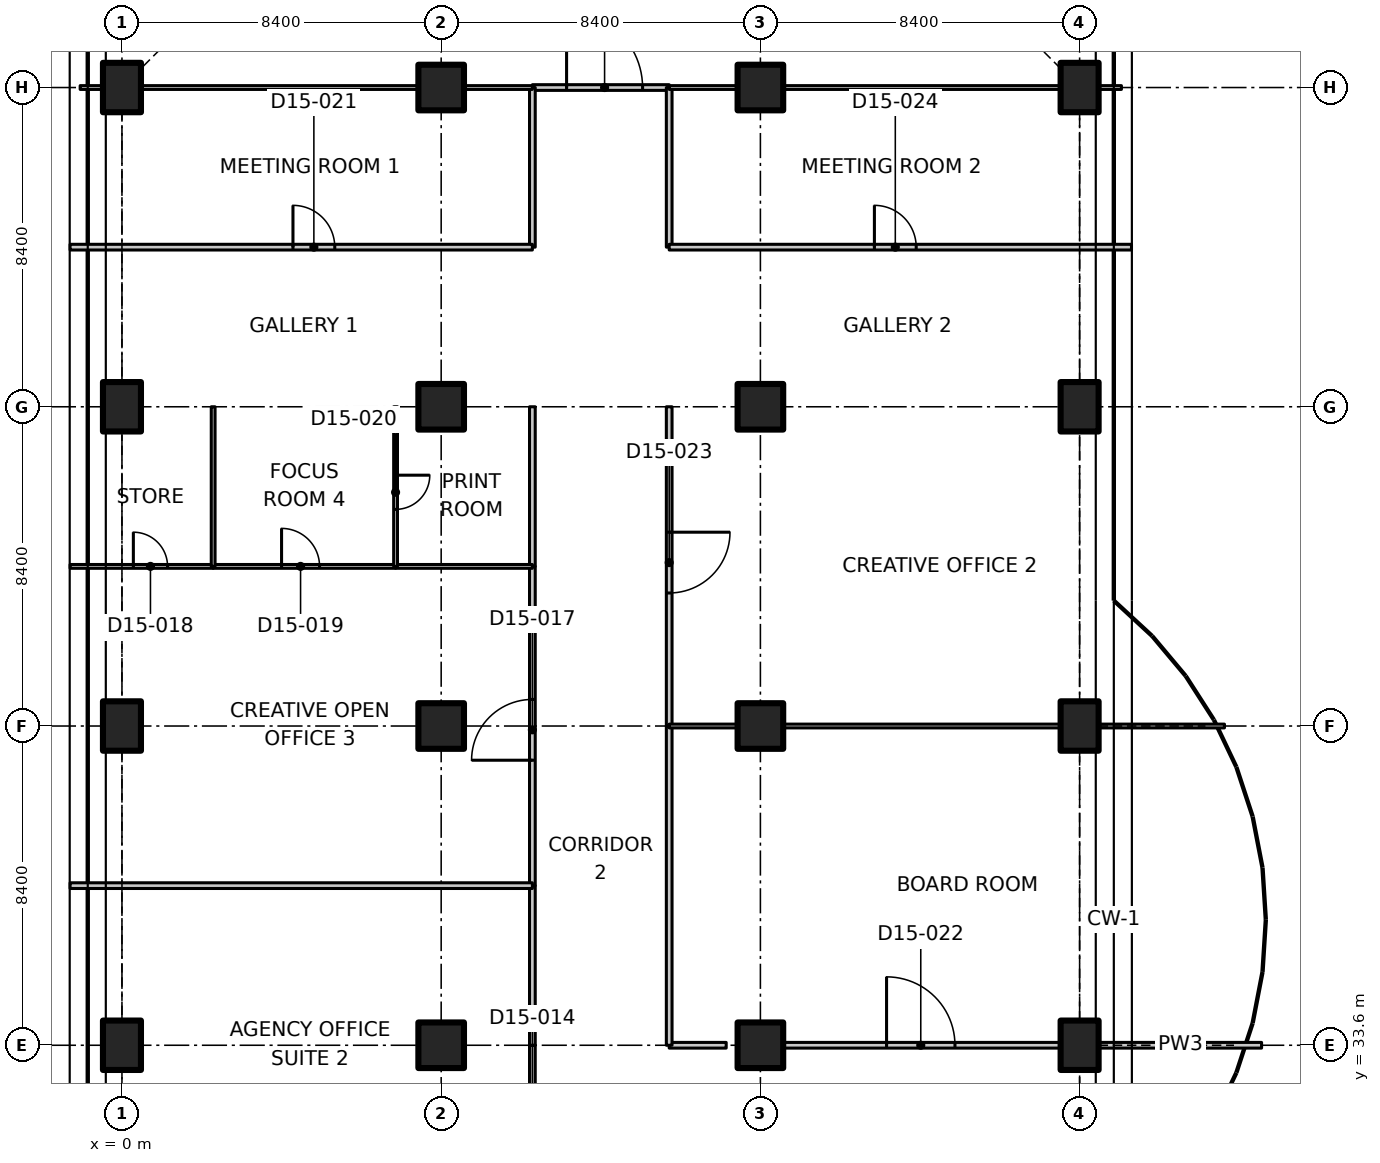
"""IFC4 building model, lengths in metres.
Left out: names, types, materials, properties, quantities, classifications, styles, units other than length and angle.
Written with IfcOpenShell. Run it as: python <this file> out.ifc"""

import sys

from ifc_helpers import new_model, si_unit, direction, frame, frame_2d, origin, origin_2d, place, context, subcontext, project, spatial, polyline, rectangle, outline, extrude, element, fill, save


model = new_model("IFC4")
c1 = context("Model", 3, precision=1e-05, world=origin(), true_north=direction((0.0, 1.0)))
c2 = subcontext(c1, "Body", "Model", "MODEL_VIEW")
j1 = project(units=[si_unit("LENGTHUNIT", "METRE"), si_unit("PLANEANGLEUNIT", "RADIAN")], contexts=[c1])
p1 = place(None, origin())
s1 = spatial("IfcSite", under=j1, at=p1, CompositionType="ELEMENT")
p2 = place(p1, origin())
s2 = spatial("IfcBuilding", under=s1, at=p2, CompositionType="ELEMENT")
p3 = place(p2, frame((0.0, 0.0, 113.3)))
s3 = spatial("IfcBuildingStorey", under=s2, at=p3, CompositionType="ELEMENT", Elevation=113.3)
for number, where, z_axis, x_axis in (
    (1, (0.0, 33.6, 0.0), (0.0, 0.0, 1.0), (1.0, 0.0, 0.0)),
    (2, (0.0, 42.0, 0.0), (0.0, 0.0, 1.0), (1.0, 0.0, 0.0)),
    (3, (0.0, 50.4, 0.0), (0.0, 0.0, 1.0), (1.0, 0.0, 0.0)),
    (4, (0.0, 58.8, 0.0), (0.0, 0.0, 1.0), (1.0, 0.0, 0.0)),
):
    element("IfcColumn", number, at=place(p3, frame(where, z_axis=z_axis, x_axis=x_axis)), inside=s3, PredefinedType="COLUMN", context=c2, shape_type="SweptSolid", body=[
        extrude(rectangle(XDim=1.0, YDim=1.3, at=origin_2d()), origin(), (0.0, 0.0, 1.0), 3.35),
    ])
for number, where, z_axis, x_axis in (
    (5, (8.4, 33.6, 0.0), (0.0, 0.0, 1.0), (1.0, 0.0, 0.0)),
    (6, (8.4, 42.0, 0.0), (0.0, 0.0, 1.0), (1.0, 0.0, 0.0)),
    (7, (8.4, 50.4, 0.0), (0.0, 0.0, 1.0), (1.0, 0.0, 0.0)),
    (8, (8.4, 58.8, 0.0), (0.0, 0.0, 1.0), (1.0, 0.0, 0.0)),
    (9, (16.8, 33.6, 0.0), (0.0, 0.0, 1.0), (1.0, 0.0, 0.0)),
    (10, (16.8, 42.0, 0.0), (0.0, 0.0, 1.0), (1.0, 0.0, 0.0)),
    (11, (16.8, 50.4, 0.0), (0.0, 0.0, 1.0), (1.0, 0.0, 0.0)),
    (12, (16.8, 58.8, 0.0), (0.0, 0.0, 1.0), (1.0, 0.0, 0.0)),
):
    element("IfcColumn", number, at=place(p3, frame(where, z_axis=z_axis, x_axis=x_axis)), inside=s3, PredefinedType="COLUMN", context=c2, shape_type="SweptSolid", body=[
        extrude(rectangle(XDim=1.2, YDim=1.2, at=origin_2d()), origin(), (0.0, 0.0, 1.0), 3.35),
    ])
for number, where, z_axis, x_axis in (
    (13, (25.2, 33.6, 0.0), (0.0, 0.0, 1.0), (1.0, 0.0, 0.0)),
    (14, (25.2, 42.0, 0.0), (0.0, 0.0, 1.0), (1.0, 0.0, 0.0)),
    (15, (25.2, 50.4, 0.0), (0.0, 0.0, 1.0), (1.0, 0.0, 0.0)),
    (16, (25.2, 58.8, 0.0), (0.0, 0.0, 1.0), (1.0, 0.0, 0.0)),
):
    element("IfcColumn", number, at=place(p3, frame(where, z_axis=z_axis, x_axis=x_axis)), inside=s3, PredefinedType="COLUMN", context=c2, shape_type="SweptSolid", body=[
        extrude(rectangle(XDim=1.0, YDim=1.3, at=origin_2d()), origin(), (0.0, 0.0, 1.0), 3.35),
    ])
p4 = place(p3, frame((10.8, 29.4, 0.0), z_axis=(0.0, 0.0, 1.0), x_axis=(0.0, 1.0, 0.0)))
e17 = element("IfcWall", 17, at=p4, inside=s3, PredefinedType="PARTITIONING", context=c2, shape_type="SweptSolid", body=[
    extrude(rectangle(XDim=4.2, YDim=0.15, at=frame_2d((2.1, 0.0))), origin(), (0.0, 0.0, 1.0), 3.33),
])
p5 = place(p4, frame((1.2, 0.0, 0.0)))
e18 = element("IfcOpeningElement", 18, at=p5, cuts=e17, PredefinedType="OPENING", context=c2, shape_type="SweptSolid", body=[
    extrude(rectangle(XDim=1.6, YDim=2.1, at=frame_2d((0.8, 1.05))), frame((0.0, 0.085, 0.0), z_axis=(0.0, -1.0, 0.0), x_axis=(1.0, 0.0, 0.0)), (0.0, 0.0, 1.0), 0.17),
])
p6 = place(p3, frame((14.4, 33.6, 0.0), z_axis=(0.0, 0.0, 1.0), x_axis=(1.0, 0.0, 0.0)))
e19 = element("IfcWall", 19, at=p6, inside=s3, PredefinedType="PARTITIONING", context=c2, shape_type="SweptSolid", body=[
    extrude(rectangle(XDim=1.5, YDim=0.15, at=frame_2d((0.75, 0.0))), origin(), (0.0, 0.0, 1.0), 3.33),
])
p7 = place(p3, frame((17.42, 33.6, 0.0), z_axis=(0.0, 0.0, 1.0), x_axis=(1.0, 0.0, 0.0)))
e20 = element("IfcWall", 20, at=p7, inside=s3, PredefinedType="PARTITIONING", context=c2, shape_type="SweptSolid", body=[
    extrude(rectangle(XDim=7.26, YDim=0.15, at=frame_2d((3.63, 0.0))), origin(), (0.0, 0.0, 1.0), 3.33),
])
p8 = place(p7, frame((2.7, 0.0, 0.0)))
e21 = element("IfcOpeningElement", 21, at=p8, cuts=e20, PredefinedType="OPENING", context=c2, shape_type="SweptSolid", body=[
    extrude(rectangle(XDim=1.8, YDim=2.1, at=frame_2d((0.9, 1.05))), frame((0.0, 0.085, 0.0), z_axis=(0.0, -1.0, 0.0), x_axis=(1.0, 0.0, 0.0)), (0.0, 0.0, 1.0), 0.17),
])
p9 = place(p3, frame((25.72, 33.6, 0.0), z_axis=(0.0, 0.0, 1.0), x_axis=(1.0, 0.0, 0.0)))
e22 = element("IfcWall", 22, at=p9, inside=s3, PredefinedType="PARTITIONING", context=c2, shape_type="SweptSolid", body=[
    extrude(rectangle(XDim=4.268, YDim=0.15, at=frame_2d((2.134, 0.0))), origin(), (0.0, 0.0, 1.0), 2.98),
])
p10 = place(p3, frame((10.8, 58.8, 0.0), z_axis=(0.0, 0.0, 1.0), x_axis=(1.0, 0.0, 0.0)))
e23 = element("IfcWall", 23, at=p10, inside=s3, PredefinedType="PARTITIONING", context=c2, shape_type="SweptSolid", body=[
    extrude(rectangle(XDim=3.6, YDim=0.15, at=frame_2d((1.8, 0.0))), origin(), (0.0, 0.0, 1.0), 3.33),
])
p11 = place(p10, frame((0.9, 0.0, 0.0)))
e24 = element("IfcOpeningElement", 24, at=p11, cuts=e23, PredefinedType="OPENING", context=c2, shape_type="SweptSolid", body=[
    extrude(rectangle(XDim=2.0, YDim=2.4, at=frame_2d((1.0, 1.2))), frame((0.0, 0.085, 0.0), z_axis=(0.0, -1.0, 0.0), x_axis=(1.0, 0.0, 0.0)), (0.0, 0.0, 1.0), 0.17),
])
p12 = place(p3, frame((10.8, 33.6, 0.0), z_axis=(0.0, 0.0, 1.0), x_axis=(0.0, 1.0, 0.0)))
e25 = element("IfcWall", 25, at=p12, inside=s3, PredefinedType="PARTITIONING", context=c2, shape_type="SweptSolid", body=[
    extrude(rectangle(XDim=4.2, YDim=0.15, at=frame_2d((2.1, 0.0))), origin(), (0.0, 0.0, 1.0), 3.33),
])
p13 = place(p3, frame((10.8, 37.8, 0.0), z_axis=(0.0, 0.0, 1.0), x_axis=(0.0, 1.0, 0.0)))
e26 = element("IfcWall", 26, at=p13, inside=s3, PredefinedType="PARTITIONING", context=c2, shape_type="SweptSolid", body=[
    extrude(rectangle(XDim=8.4, YDim=0.15, at=frame_2d((4.2, 0.0))), origin(), (0.0, 0.0, 1.0), 3.33),
])
p14 = place(p13, frame((3.3, 0.0, 0.0)))
e27 = element("IfcOpeningElement", 27, at=p14, cuts=e26, PredefinedType="OPENING", context=c2, shape_type="SweptSolid", body=[
    extrude(rectangle(XDim=1.6, YDim=2.1, at=frame_2d((0.8, 1.05))), frame((0.0, 0.085, 0.0), z_axis=(0.0, -1.0, 0.0), x_axis=(1.0, 0.0, 0.0)), (0.0, 0.0, 1.0), 0.17),
])
for number, where, z_axis, x_axis in (
    (28, (10.8, 46.2, 0.0), (0.0, 0.0, 1.0), (0.0, 1.0, 0.0)),
    (29, (10.8, 54.6, 0.0), (0.0, 0.0, 1.0), (0.0, 1.0, 0.0)),
):
    element("IfcWall", number, at=place(p3, frame(where, z_axis=z_axis, x_axis=x_axis)), inside=s3, PredefinedType="PARTITIONING", context=c2, shape_type="SweptSolid", body=[
        extrude(rectangle(XDim=4.2, YDim=0.15, at=frame_2d((2.1, 0.0))), origin(), (0.0, 0.0, 1.0), 3.33),
    ])
p15 = place(p3, frame((14.4, 42.0, 0.0), z_axis=(0.0, 0.0, 1.0), x_axis=(0.0, -1.0, 0.0)))
e30 = element("IfcWall", 30, at=p15, inside=s3, PredefinedType="PARTITIONING", context=c2, shape_type="SweptSolid", body=[
    extrude(rectangle(XDim=8.4, YDim=0.15, at=frame_2d((4.2, 0.0))), origin(), (0.0, 0.0, 1.0), 3.33),
])
p16 = place(p3, frame((14.4, 50.4, 0.0), z_axis=(0.0, 0.0, 1.0), x_axis=(0.0, -1.0, 0.0)))
e31 = element("IfcWall", 31, at=p16, inside=s3, PredefinedType="PARTITIONING", context=c2, shape_type="SweptSolid", body=[
    extrude(rectangle(XDim=8.4, YDim=0.15, at=frame_2d((4.2, 0.0))), origin(), (0.0, 0.0, 1.0), 3.33),
])
p17 = place(p16, frame((3.3, 0.0, 0.0)))
e32 = element("IfcOpeningElement", 32, at=p17, cuts=e31, PredefinedType="OPENING", context=c2, shape_type="SweptSolid", body=[
    extrude(rectangle(XDim=1.6, YDim=2.1, at=frame_2d((0.8, 1.05))), frame((0.0, 0.085, 0.0), z_axis=(0.0, -1.0, 0.0), x_axis=(1.0, 0.0, 0.0)), (0.0, 0.0, 1.0), 0.17),
])
p18 = place(p3, frame((14.4, 58.8, 0.0), z_axis=(0.0, 0.0, 1.0), x_axis=(0.0, -1.0, 0.0)))
e33 = element("IfcWall", 33, at=p18, inside=s3, PredefinedType="PARTITIONING", context=c2, shape_type="SweptSolid", body=[
    extrude(rectangle(XDim=4.2, YDim=0.15, at=frame_2d((2.1, 0.0))), origin(), (0.0, 0.0, 1.0), 3.33),
])
p19 = place(p3, frame((10.8, 58.8, 0.0), z_axis=(0.0, 0.0, 1.0), x_axis=(-1.0, 0.0, 0.0)))
e34 = element("IfcWall", 34, at=p19, inside=s3, PredefinedType="PARTITIONING", context=c2, shape_type="SweptSolid", body=[
    extrude(rectangle(XDim=1.78, YDim=0.1, at=frame_2d((0.89, 0.0))), origin(), (0.0, 0.0, 1.0), 3.33),
])
p20 = place(p3, frame((7.78, 58.8, 0.0), z_axis=(0.0, 0.0, 1.0), x_axis=(-1.0, 0.0, 0.0)))
e35 = element("IfcWall", 35, at=p20, inside=s3, PredefinedType="PARTITIONING", context=c2, shape_type="SweptSolid", body=[
    extrude(outline(polyline([(0.0, 0.0), (7.26, 0.0), (7.26, 2.98), (7.116, 2.98), (7.114, 3.33), (0.0, 3.33), (0.0, 0.0)])), frame((0.0, 0.05, 0.0), z_axis=(0.0, -1.0, 0.0), x_axis=(1.0, 0.0, 0.0)), (0.0, 0.0, 1.0), 0.1),
])
for number, where, z_axis, x_axis in (
    (36, (-0.52, 58.8, 0.0), (0.0, 0.0, 1.0), (-1.0, 0.0, 0.0)),
    (37, (26.3, 58.8, 0.0), (0.0, 0.0, 1.0), (-1.0, 0.0, 0.0)),
):
    element("IfcWall", number, at=place(p3, frame(where, z_axis=z_axis, x_axis=x_axis)), inside=s3, PredefinedType="PARTITIONING", context=c2, shape_type="SweptSolid", body=[
        extrude(rectangle(XDim=0.58, YDim=0.1, at=frame_2d((0.29, 0.0))), origin(), (0.0, 0.0, 1.0), 3.33),
    ])
p21 = place(p3, frame((24.68, 58.8, 0.0), z_axis=(0.0, 0.0, 1.0), x_axis=(-1.0, 0.0, 0.0)))
e38 = element("IfcWall", 38, at=p21, inside=s3, PredefinedType="PARTITIONING", context=c2, shape_type="SweptSolid", body=[
    extrude(outline(polyline([(0.0, 0.0), (7.26, 0.0), (7.26, 3.33), (0.146, 3.33), (0.144, 2.98), (0.0, 2.98), (0.0, 0.0)])), frame((0.0, 0.05, 0.0), z_axis=(0.0, -1.0, 0.0), x_axis=(1.0, 0.0, 0.0)), (0.0, 0.0, 1.0), 0.1),
])
p22 = place(p3, frame((16.18, 58.8, 0.0), z_axis=(0.0, 0.0, 1.0), x_axis=(-1.0, 0.0, 0.0)))
e39 = element("IfcWall", 39, at=p22, inside=s3, PredefinedType="PARTITIONING", context=c2, shape_type="SweptSolid", body=[
    extrude(rectangle(XDim=1.78, YDim=0.1, at=frame_2d((0.89, 0.0))), origin(), (0.0, 0.0, 1.0), 3.33),
])
p23 = place(p3, frame((-1.365, 54.6, 0.0), z_axis=(0.0, 0.0, 1.0), x_axis=(1.0, 0.0, 0.0)))
e40 = element("IfcWall", 40, at=p23, inside=s3, PredefinedType="PARTITIONING", context=c2, shape_type="SweptSolid", body=[
    extrude(outline(polyline([(0.0, 0.0), (12.165, 0.0), (12.165, 3.33), (1.815, 3.33), (1.813, 2.98), (0.917, 2.98), (0.915, 3.33), (0.265, 3.33), (0.0, 3.33), (0.0, 0.0)])), frame((0.0, 0.075, 0.0), z_axis=(0.0, -1.0, 0.0), x_axis=(1.0, 0.0, 0.0)), (0.0, 0.0, 1.0), 0.15),
])
p24 = place(p23, frame((5.865, 0.0, 0.0)))
e41 = element("IfcOpeningElement", 41, at=p24, cuts=e40, PredefinedType="OPENING", context=c2, shape_type="SweptSolid", body=[
    extrude(rectangle(XDim=1.1, YDim=2.1, at=frame_2d((0.55, 1.05))), frame((0.0, 0.085, 0.0), z_axis=(0.0, -1.0, 0.0), x_axis=(1.0, 0.0, 0.0)), (0.0, 0.0, 1.0), 0.17),
])
p25 = place(p3, frame((-1.365, 37.8, 0.0), z_axis=(0.0, 0.0, 1.0), x_axis=(1.0, 0.0, 0.0)))
e42 = element("IfcWall", 42, at=p25, inside=s3, PredefinedType="PARTITIONING", context=c2, shape_type="SweptSolid", body=[
    extrude(outline(polyline([(0.0, 0.0), (12.165, 0.0), (12.165, 3.33), (1.815, 3.33), (1.813, 2.98), (0.917, 2.98), (0.915, 3.33), (0.265, 3.33), (0.0, 3.33), (0.0, 0.0)])), frame((0.0, 0.075, 0.0), z_axis=(0.0, -1.0, 0.0), x_axis=(1.0, 0.0, 0.0)), (0.0, 0.0, 1.0), 0.15),
])
p26 = place(p3, frame((-1.365, 46.2, 0.0), z_axis=(0.0, 0.0, 1.0), x_axis=(1.0, 0.0, 0.0)))
e43 = element("IfcWall", 43, at=p26, inside=s3, PredefinedType="PARTITIONING", context=c2, shape_type="SweptSolid", body=[
    extrude(rectangle(XDim=3.765, YDim=0.1, at=frame_2d((1.882, 0.0))), origin(), (0.0, 0.0, 1.0), 2.98),
])
p27 = place(p26, frame((1.665, 0.0, 0.0)))
e44 = element("IfcOpeningElement", 44, at=p27, cuts=e43, PredefinedType="OPENING", context=c2, shape_type="SweptSolid", body=[
    extrude(rectangle(XDim=0.9, YDim=2.1, at=frame_2d((0.45, 1.05))), frame((0.0, 0.06, 0.0), z_axis=(0.0, -1.0, 0.0), x_axis=(1.0, 0.0, 0.0)), (0.0, 0.0, 1.0), 0.12),
])
p28 = place(p3, frame((2.4, 46.2, 0.0), z_axis=(0.0, 0.0, 1.0), x_axis=(1.0, 0.0, 0.0)))
e45 = element("IfcWall", 45, at=p28, inside=s3, PredefinedType="PARTITIONING", context=c2, shape_type="SweptSolid", body=[
    extrude(rectangle(XDim=4.8, YDim=0.1, at=frame_2d((2.4, 0.0))), origin(), (0.0, 0.0, 1.0), 3.33),
])
p29 = place(p28, frame((1.8, 0.0, 0.0)))
e46 = element("IfcOpeningElement", 46, at=p29, cuts=e45, PredefinedType="OPENING", context=c2, shape_type="SweptSolid", body=[
    extrude(rectangle(XDim=1.0, YDim=2.1, at=frame_2d((0.5, 1.05))), frame((0.0, 0.06, 0.0), z_axis=(0.0, -1.0, 0.0), x_axis=(1.0, 0.0, 0.0)), (0.0, 0.0, 1.0), 0.12),
])
p30 = place(p3, frame((7.2, 46.2, 0.0), z_axis=(0.0, 0.0, 1.0), x_axis=(1.0, 0.0, 0.0)))
e47 = element("IfcWall", 47, at=p30, inside=s3, PredefinedType="PARTITIONING", context=c2, shape_type="SweptSolid", body=[
    extrude(rectangle(XDim=3.6, YDim=0.1, at=frame_2d((1.8, 0.0))), origin(), (0.0, 0.0, 1.0), 3.33),
])
p31 = place(p3, frame((2.4, 50.4, 0.0), z_axis=(0.0, 0.0, 1.0), x_axis=(0.0, -1.0, 0.0)))
e48 = element("IfcWall", 48, at=p31, inside=s3, PredefinedType="PARTITIONING", context=c2, shape_type="SweptSolid", body=[
    extrude(rectangle(XDim=4.2, YDim=0.1, at=frame_2d((2.1, 0.0))), origin(), (0.0, 0.0, 1.0), 3.33),
])
p32 = place(p3, frame((7.2, 50.4, 0.0), z_axis=(0.0, 0.0, 1.0), x_axis=(0.0, -1.0, 0.0)))
e49 = element("IfcWall", 49, at=p32, inside=s3, PredefinedType="PARTITIONING", context=c2, shape_type="SweptSolid", body=[
    extrude(rectangle(XDim=4.2, YDim=0.1, at=frame_2d((2.1, 0.0))), origin(), (0.0, 0.0, 1.0), 3.33),
])
p33 = place(p32, frame((1.8, 0.0, 0.0)))
e50 = element("IfcOpeningElement", 50, at=p33, cuts=e49, PredefinedType="OPENING", context=c2, shape_type="SweptSolid", body=[
    extrude(rectangle(XDim=0.9, YDim=2.1, at=frame_2d((0.45, 1.05))), frame((0.0, 0.06, 0.0), z_axis=(0.0, -1.0, 0.0), x_axis=(1.0, 0.0, 0.0)), (0.0, 0.0, 1.0), 0.12),
])
p34 = place(p3, frame((14.4, 54.6, 0.0), z_axis=(0.0, 0.0, 1.0), x_axis=(1.0, 0.0, 0.0)))
e51 = element("IfcWall", 51, at=p34, inside=s3, PredefinedType="PARTITIONING", context=c2, shape_type="SweptSolid", body=[
    extrude(outline(polyline([(0.0, 0.0), (12.165, 0.0), (12.165, 3.33), (11.9, 3.33), (11.25, 3.33), (11.248, 2.98), (10.352, 2.98), (10.35, 3.33), (0.0, 3.33), (0.0, 0.0)])), frame((0.0, 0.075, 0.0), z_axis=(0.0, -1.0, 0.0), x_axis=(1.0, 0.0, 0.0)), (0.0, 0.0, 1.0), 0.15),
])
p35 = place(p34, frame((5.4, 0.0, 0.0)))
e52 = element("IfcOpeningElement", 52, at=p35, cuts=e51, PredefinedType="OPENING", context=c2, shape_type="SweptSolid", body=[
    extrude(rectangle(XDim=1.1, YDim=2.1, at=frame_2d((0.55, 1.05))), frame((0.0, 0.085, 0.0), z_axis=(0.0, -1.0, 0.0), x_axis=(1.0, 0.0, 0.0)), (0.0, 0.0, 1.0), 0.17),
])
p36 = place(p3, frame((14.4, 42.0, 0.0), z_axis=(0.0, 0.0, 1.0), x_axis=(1.0, 0.0, 0.0)))
e53 = element("IfcWall", 53, at=p36, inside=s3, PredefinedType="PARTITIONING", context=c2, shape_type="SweptSolid", body=[
    extrude(rectangle(XDim=1.78, YDim=0.1, at=frame_2d((0.89, 0.0))), origin(), (0.0, 0.0, 1.0), 3.33),
])
p37 = place(p3, frame((17.42, 42.0, 0.0), z_axis=(0.0, 0.0, 1.0), x_axis=(1.0, 0.0, 0.0)))
e54 = element("IfcWall", 54, at=p37, inside=s3, PredefinedType="PARTITIONING", context=c2, shape_type="SweptSolid", body=[
    extrude(rectangle(XDim=7.26, YDim=0.1, at=frame_2d((3.63, 0.0))), origin(), (0.0, 0.0, 1.0), 3.33),
])
p38 = place(p3, frame((25.72, 42.0, 0.0), z_axis=(0.0, 0.0, 1.0), x_axis=(1.0, 0.0, 0.0)))
e55 = element("IfcWall", 55, at=p38, inside=s3, PredefinedType="PARTITIONING", context=c2, shape_type="SweptSolid", body=[
    extrude(rectangle(XDim=3.292, YDim=0.1, at=frame_2d((1.646, 0.0))), origin(), (0.0, 0.0, 1.0), 2.98),
])
p39 = place(p11, origin())
e56 = element("IfcDoor", 56, at=p39, inside=s3, OperationType="DOUBLE_DOOR_SINGLE_SWING", PredefinedType="DOOR", context=c2, shape_type="SweptSolid", body=[
    extrude(rectangle(XDim=2.0, YDim=2.4, at=frame_2d((1.0, 1.2))), frame((0.0, 0.025, 0.0), z_axis=(0.0, -1.0, 0.0), x_axis=(1.0, 0.0, 0.0)), (0.0, 0.0, 1.0), 0.05),
])
fill(e24, e56)
p40 = place(p14, origin())
e57 = element("IfcDoor", 57, at=p40, inside=s3, OperationType="DOUBLE_DOOR_SINGLE_SWING", PredefinedType="DOOR", context=c2, shape_type="SweptSolid", body=[
    extrude(rectangle(XDim=1.6, YDim=2.1, at=frame_2d((0.8, 1.05))), frame((0.0, 0.025, 0.0), z_axis=(0.0, -1.0, 0.0), x_axis=(1.0, 0.0, 0.0)), (0.0, 0.0, 1.0), 0.05),
])
fill(e27, e57)
p41 = place(p27, origin())
e58 = element("IfcDoor", 58, at=p41, inside=s3, OperationType="SINGLE_SWING_LEFT", PredefinedType="DOOR", context=c2, shape_type="SweptSolid", body=[
    extrude(rectangle(XDim=0.9, YDim=2.1, at=frame_2d((0.45, 1.05))), frame((0.0, 0.025, 0.0), z_axis=(0.0, -1.0, 0.0), x_axis=(1.0, 0.0, 0.0)), (0.0, 0.0, 1.0), 0.05),
])
fill(e44, e58)
p42 = place(p29, origin())
e59 = element("IfcDoor", 59, at=p42, inside=s3, OperationType="SINGLE_SWING_LEFT", PredefinedType="DOOR", context=c2, shape_type="SweptSolid", body=[
    extrude(rectangle(XDim=1.0, YDim=2.1, at=frame_2d((0.5, 1.05))), frame((0.0, 0.025, 0.0), z_axis=(0.0, -1.0, 0.0), x_axis=(1.0, 0.0, 0.0)), (0.0, 0.0, 1.0), 0.05),
])
fill(e46, e59)
p43 = place(p33, origin())
e60 = element("IfcDoor", 60, at=p43, inside=s3, OperationType="SINGLE_SWING_LEFT", PredefinedType="DOOR", context=c2, shape_type="SweptSolid", body=[
    extrude(rectangle(XDim=0.9, YDim=2.1, at=frame_2d((0.45, 1.05))), frame((0.0, 0.025, 0.0), z_axis=(0.0, -1.0, 0.0), x_axis=(1.0, 0.0, 0.0)), (0.0, 0.0, 1.0), 0.05),
])
fill(e50, e60)
p44 = place(p24, origin())
e61 = element("IfcDoor", 61, at=p44, inside=s3, OperationType="SINGLE_SWING_LEFT", PredefinedType="DOOR", context=c2, shape_type="SweptSolid", body=[
    extrude(rectangle(XDim=1.1, YDim=2.1, at=frame_2d((0.55, 1.05))), frame((0.0, 0.025, 0.0), z_axis=(0.0, -1.0, 0.0), x_axis=(1.0, 0.0, 0.0)), (0.0, 0.0, 1.0), 0.05),
])
fill(e41, e61)
p45 = place(p8, origin())
e62 = element("IfcDoor", 62, at=p45, inside=s3, OperationType="DOUBLE_DOOR_SINGLE_SWING", PredefinedType="DOOR", context=c2, shape_type="SweptSolid", body=[
    extrude(rectangle(XDim=1.8, YDim=2.1, at=frame_2d((0.9, 1.05))), frame((0.0, 0.025, 0.0), z_axis=(0.0, -1.0, 0.0), x_axis=(1.0, 0.0, 0.0)), (0.0, 0.0, 1.0), 0.05),
])
fill(e21, e62)
p46 = place(p17, origin())
e63 = element("IfcDoor", 63, at=p46, inside=s3, OperationType="DOUBLE_DOOR_SINGLE_SWING", PredefinedType="DOOR", context=c2, shape_type="SweptSolid", body=[
    extrude(rectangle(XDim=1.6, YDim=2.1, at=frame_2d((0.8, 1.05))), frame((0.0, 0.025, 0.0), z_axis=(0.0, -1.0, 0.0), x_axis=(1.0, 0.0, 0.0)), (0.0, 0.0, 1.0), 0.05),
])
fill(e32, e63)
p47 = place(p35, origin())
e64 = element("IfcDoor", 64, at=p47, inside=s3, OperationType="SINGLE_SWING_LEFT", PredefinedType="DOOR", context=c2, shape_type="SweptSolid", body=[
    extrude(rectangle(XDim=1.1, YDim=2.1, at=frame_2d((0.55, 1.05))), frame((0.0, 0.025, 0.0), z_axis=(0.0, -1.0, 0.0), x_axis=(1.0, 0.0, 0.0)), (0.0, 0.0, 1.0), 0.05),
])
fill(e52, e64)
save(model, sys.argv[1])
